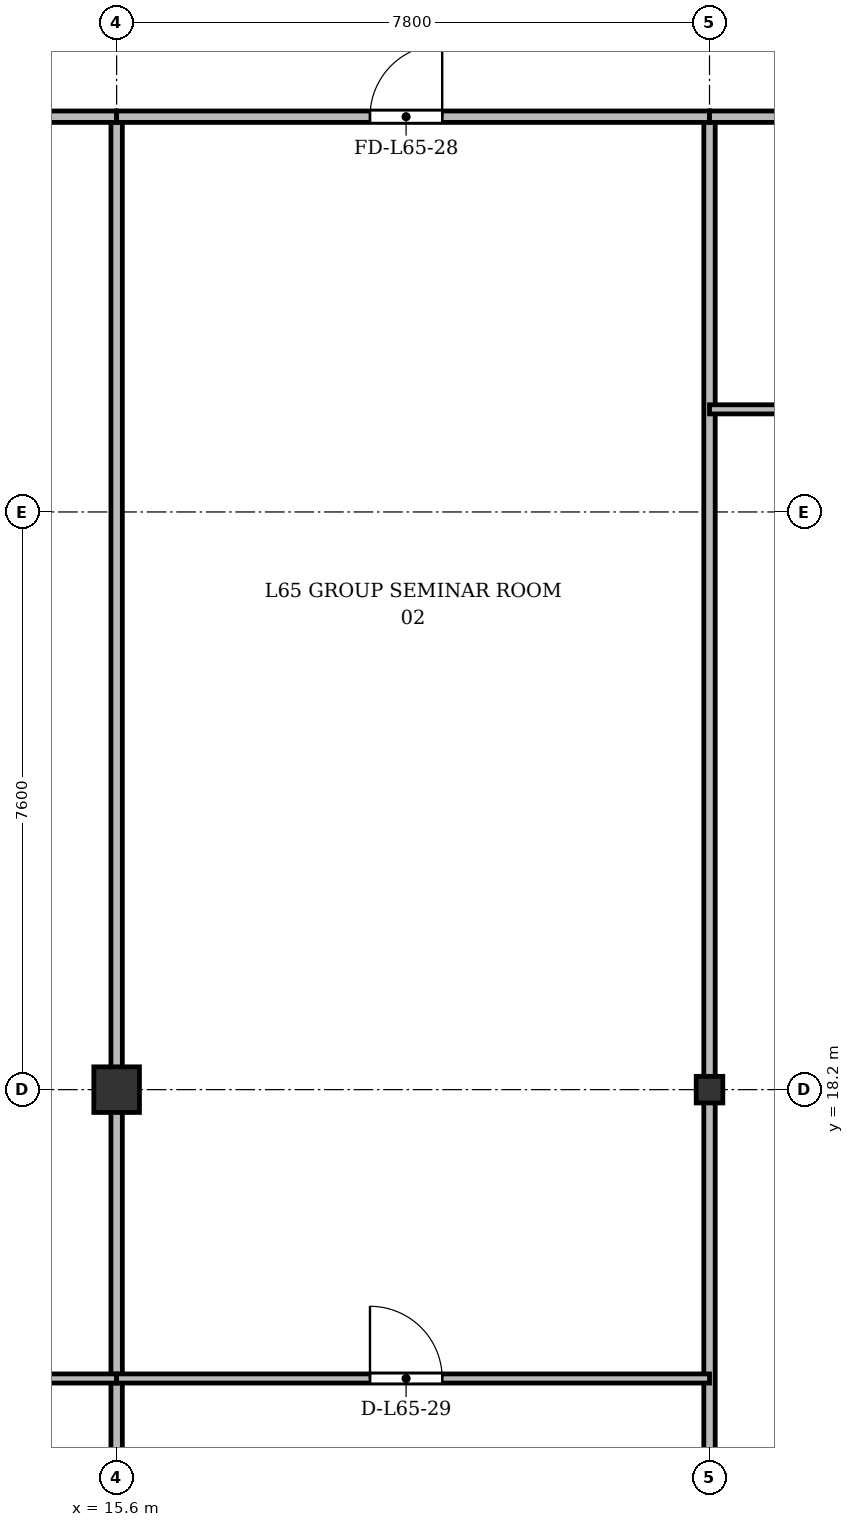
"""IFC4 building model, lengths in metres.
Left out: names, types, materials, properties, quantities, classifications, styles, units other than length and angle.
Written with IfcOpenShell. Run it as: python <this file> out.ifc"""

import sys

from ifc_helpers import new_model, si_unit, direction, frame, frame_2d, origin, origin_2d, place, context, subcontext, project, spatial, rectangle, i_section, extrude, source, transform, mapped, element, fill, save


model = new_model("IFC4")
c1 = context("Model", 3, precision=1e-05, world=origin(), true_north=direction((0.0, 1.0)))
c2 = subcontext(c1, "Body", "Model", "MODEL_VIEW")
j1 = project(units=[si_unit("LENGTHUNIT", "METRE"), si_unit("PLANEANGLEUNIT", "RADIAN")], contexts=[c1])
p1 = place(None, origin())
s1 = spatial("IfcSite", under=j1, at=p1, CompositionType="ELEMENT")
p2 = place(p1, origin())
s2 = spatial("IfcBuilding", under=s1, at=p2, CompositionType="ELEMENT")
p3 = place(p2, frame((0.0, 0.0, 252.3)))
s3 = spatial("IfcBuildingStorey", under=s2, at=p3, CompositionType="ELEMENT", Elevation=252.3)
m1 = source(origin(), c2, "Body", "SweptSolid", [
    extrude(rectangle(XDim=0.6, YDim=0.6, at=origin_2d()), origin(), (0.0, 0.0, 1.0), 3.6),
])
p4 = place(p3, frame((15.6, 18.2, 0.0), z_axis=(0.0, 0.0, 1.0), x_axis=(1.0, 0.0, 0.0)))
e1 = element("IfcColumn", 1, at=p4, inside=s3, PredefinedType="COLUMN", context=c2, shape_type="MappedRepresentation", body=[
    mapped(m1, transform((0.0, 0.0, 0.0), x_axis=(1.0, 0.0, 0.0), y_axis=(0.0, 1.0, 0.0), z_axis=(0.0, 0.0, 1.0), scale=1.0)),
])
m2 = source(origin(), c2, "Body", "SweptSolid", [
    extrude(i_section(OverallWidth=0.35, OverallDepth=0.35, WebThickness=0.018, FlangeThickness=0.028, at=origin_2d()), origin(), (0.0, 0.0, 1.0), 3.6),
])
p5 = place(p3, frame((23.4, 18.2, 0.0), z_axis=(0.0, 0.0, 1.0), x_axis=(1.0, 0.0, 0.0)))
e2 = element("IfcColumn", 2, at=p5, inside=s3, PredefinedType="COLUMN", context=c2, shape_type="MappedRepresentation", body=[
    mapped(m2, transform((0.0, 0.0, 0.0), x_axis=(1.0, 0.0, 0.0), y_axis=(0.0, 1.0, 0.0), z_axis=(0.0, 0.0, 1.0), scale=1.0)),
])
for number, where, z_axis, x_axis in (
    (3, (15.6, 3.725, 0.0), (0.0, 0.0, 1.0), (0.0, 1.0, 0.0)),
    (4, (23.4, 3.725, 0.0), (0.0, 0.0, 1.0), (0.0, 1.0, 0.0)),
):
    element("IfcWall", number, at=place(p3, frame(where, z_axis=z_axis, x_axis=x_axis)), inside=s3, PredefinedType="PARTITIONING", context=c2, shape_type="SweptSolid", body=[
        extrude(rectangle(XDim=27.275, YDim=0.15, at=frame_2d((13.637, 0.0))), origin(), (0.0, 0.0, 1.0), 2.87),
    ])
p6 = place(p3, frame((8.425, 31.0, 0.0), z_axis=(0.0, 0.0, 1.0), x_axis=(1.0, 0.0, 0.0)))
e5 = element("IfcWall", 5, at=p6, inside=s3, PredefinedType="PARTITIONING", context=c2, shape_type="SweptSolid", body=[
    extrude(rectangle(XDim=7.175, YDim=0.15, at=frame_2d((3.587, 0.0))), origin(), (0.0, 0.0, 1.0), 2.87),
])
p7 = place(p6, frame((3.112, 0.0, 0.0)))
e6 = element("IfcOpeningElement", 6, at=p7, cuts=e5, PredefinedType="OPENING", context=c2, shape_type="SweptSolid", body=[
    extrude(rectangle(XDim=0.95, YDim=2.15, at=frame_2d((0.475, 1.075))), frame((0.0, 0.085, 0.0), z_axis=(0.0, -1.0, 0.0), x_axis=(1.0, 0.0, 0.0)), (0.0, 0.0, 1.0), 0.17),
])
p8 = place(p3, frame((8.425, 14.4, 0.0), z_axis=(0.0, 0.0, 1.0), x_axis=(1.0, 0.0, 0.0)))
e7 = element("IfcWall", 7, at=p8, inside=s3, PredefinedType="PARTITIONING", context=c2, shape_type="SweptSolid", body=[
    extrude(rectangle(XDim=7.175, YDim=0.12, at=frame_2d((3.587, 0.0))), origin(), (0.0, 0.0, 1.0), 2.87),
])
p9 = place(p8, frame((3.112, 0.0, 0.0)))
e8 = element("IfcOpeningElement", 8, at=p9, cuts=e7, PredefinedType="OPENING", context=c2, shape_type="SweptSolid", body=[
    extrude(rectangle(XDim=0.95, YDim=2.15, at=frame_2d((0.475, 1.075))), frame((0.0, 0.07, 0.0), z_axis=(0.0, -1.0, 0.0), x_axis=(1.0, 0.0, 0.0)), (0.0, 0.0, 1.0), 0.14),
])
p10 = place(p3, frame((15.6, 31.0, 0.0), z_axis=(0.0, 0.0, 1.0), x_axis=(1.0, 0.0, 0.0)))
e9 = element("IfcWall", 9, at=p10, inside=s3, PredefinedType="PARTITIONING", context=c2, shape_type="SweptSolid", body=[
    extrude(rectangle(XDim=7.8, YDim=0.15, at=frame_2d((3.9, 0.0))), origin(), (0.0, 0.0, 1.0), 2.87),
])
p11 = place(p10, frame((3.333, 0.0, 0.0)))
e10 = element("IfcOpeningElement", 10, at=p11, cuts=e9, PredefinedType="OPENING", context=c2, shape_type="SweptSolid", body=[
    extrude(rectangle(XDim=0.95, YDim=2.15, at=frame_2d((0.475, 1.075))), frame((0.0, 0.085, 0.0), z_axis=(0.0, -1.0, 0.0), x_axis=(1.0, 0.0, 0.0)), (0.0, 0.0, 1.0), 0.17),
])
p12 = place(p3, frame((15.6, 14.4, 0.0), z_axis=(0.0, 0.0, 1.0), x_axis=(1.0, 0.0, 0.0)))
e11 = element("IfcWall", 11, at=p12, inside=s3, PredefinedType="PARTITIONING", context=c2, shape_type="SweptSolid", body=[
    extrude(rectangle(XDim=7.8, YDim=0.12, at=frame_2d((3.9, 0.0))), origin(), (0.0, 0.0, 1.0), 2.87),
])
p13 = place(p12, frame((3.333, 0.0, 0.0)))
e12 = element("IfcOpeningElement", 12, at=p13, cuts=e11, PredefinedType="OPENING", context=c2, shape_type="SweptSolid", body=[
    extrude(rectangle(XDim=0.95, YDim=2.15, at=frame_2d((0.475, 1.075))), frame((0.0, 0.07, 0.0), z_axis=(0.0, -1.0, 0.0), x_axis=(1.0, 0.0, 0.0)), (0.0, 0.0, 1.0), 0.14),
])
p14 = place(p3, frame((23.4, 31.0, 0.0), z_axis=(0.0, 0.0, 1.0), x_axis=(1.0, 0.0, 0.0)))
e13 = element("IfcWall", 13, at=p14, inside=s3, PredefinedType="PARTITIONING", context=c2, shape_type="SweptSolid", body=[
    extrude(rectangle(XDim=7.2, YDim=0.15, at=frame_2d((3.6, 0.0))), origin(), (0.0, 0.0, 1.0), 2.87),
])
p15 = place(p14, frame((3.125, 0.0, 0.0)))
e14 = element("IfcOpeningElement", 14, at=p15, cuts=e13, PredefinedType="OPENING", context=c2, shape_type="SweptSolid", body=[
    extrude(rectangle(XDim=0.95, YDim=2.15, at=frame_2d((0.475, 1.075))), frame((0.0, 0.085, 0.0), z_axis=(0.0, -1.0, 0.0), x_axis=(1.0, 0.0, 0.0)), (0.0, 0.0, 1.0), 0.17),
])
p16 = place(p3, frame((23.4, 27.15, 0.0), z_axis=(0.0, 0.0, 1.0), x_axis=(1.0, 0.0, 0.0)))
e15 = element("IfcWall", 15, at=p16, inside=s3, PredefinedType="PARTITIONING", context=c2, shape_type="SweptSolid", body=[
    extrude(rectangle(XDim=7.2, YDim=0.12, at=frame_2d((3.6, 0.0))), origin(), (0.0, 0.0, 1.0), 2.87),
])
p17 = place(p16, frame((3.125, 0.0, 0.0)))
e16 = element("IfcOpeningElement", 16, at=p17, cuts=e15, PredefinedType="OPENING", context=c2, shape_type="SweptSolid", body=[
    extrude(rectangle(XDim=0.95, YDim=2.15, at=frame_2d((0.475, 1.075))), frame((0.0, 0.07, 0.0), z_axis=(0.0, -1.0, 0.0), x_axis=(1.0, 0.0, 0.0)), (0.0, 0.0, 1.0), 0.14),
])
m3 = source(origin(), c2, "Body", "SweptSolid", [
    extrude(rectangle(XDim=0.95, YDim=2.15, at=frame_2d((0.475, 1.075))), frame((0.0, 0.025, 0.0), z_axis=(0.0, -1.0, 0.0), x_axis=(1.0, 0.0, 0.0)), (0.0, 0.0, 1.0), 0.05),
])
p18 = place(p11, origin())
e17 = element("IfcDoor", 17, at=p18, inside=s3, OperationType="SINGLE_SWING_RIGHT", PredefinedType="DOOR", context=c2, shape_type="MappedRepresentation", body=[
    mapped(m3, transform((0.0, 0.0, 0.0), x_axis=(1.0, 0.0, 0.0), y_axis=(0.0, 1.0, 0.0), z_axis=(0.0, 0.0, 1.0), scale=1.0)),
])
fill(e10, e17)
p19 = place(p13, origin())
e18 = element("IfcDoor", 18, at=p19, inside=s3, OperationType="SINGLE_SWING_LEFT", PredefinedType="DOOR", context=c2, shape_type="MappedRepresentation", body=[
    mapped(m3, transform((0.0, 0.0, 0.0), x_axis=(1.0, 0.0, 0.0), y_axis=(0.0, 1.0, 0.0), z_axis=(0.0, 0.0, 1.0), scale=1.0)),
])
fill(e12, e18)
save(model, sys.argv[1])
